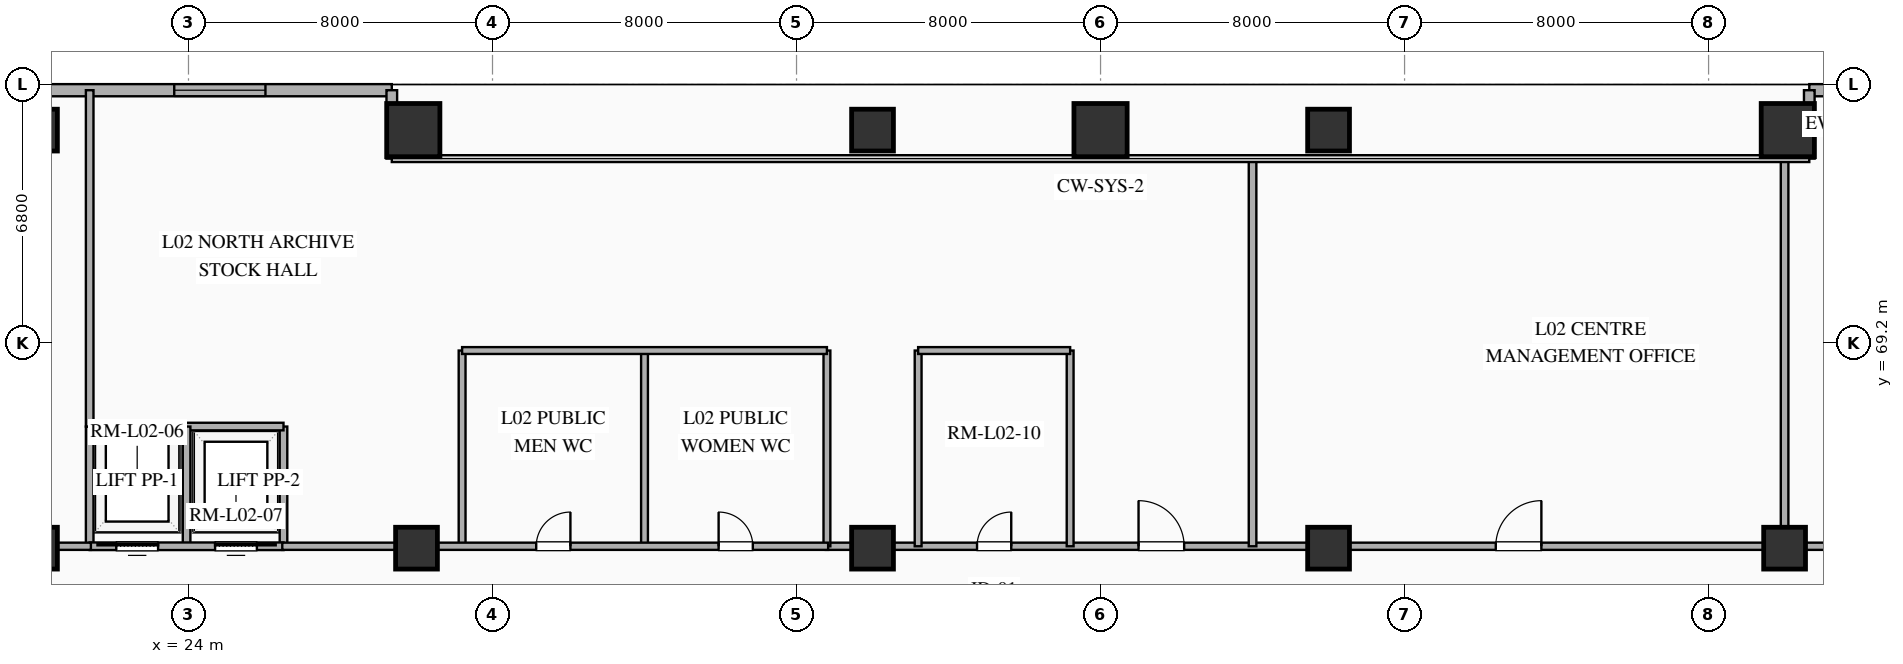
"""IFC4 building model, lengths in metres.
Left out: names, types, materials, properties, quantities, classifications, styles, units other than length and angle.
Written with IfcOpenShell. Run it as: python <this file> out.ifc"""

import sys

from ifc_helpers import new_model, si_unit, direction, frame, frame_2d, origin, origin_2d, place, context, subcontext, project, spatial, rectangle, extrude, element, fill, save


model = new_model("IFC4")
c1 = context("Model", 3, precision=1e-05, world=origin(), true_north=direction((0.0, 1.0)))
c2 = subcontext(c1, "Body", "Model", "MODEL_VIEW")
j1 = project(units=[si_unit("LENGTHUNIT", "METRE"), si_unit("PLANEANGLEUNIT", "RADIAN")], contexts=[c1])
p1 = place(None, origin())
s1 = spatial("IfcSite", under=j1, at=p1, CompositionType="ELEMENT")
p2 = place(p1, origin())
s2 = spatial("IfcBuilding", under=s1, at=p2, CompositionType="ELEMENT")
p3 = place(p2, frame((0.0, 0.0, 11.4)))
s3 = spatial("IfcBuildingStorey", under=s2, at=p3, CompositionType="ELEMENT", Elevation=11.4)
for number, where, z_axis, x_axis in (
    (1, (20.0, 74.8, 0.0), (0.0, 0.0, 1.0), (1.0, 0.0, 0.0)),
    (2, (20.0, 63.8, 0.0), (0.0, 0.0, 1.0), (1.0, 0.0, 0.0)),
    (3, (30.0, 63.8, 0.0), (0.0, 0.0, 1.0), (1.0, 0.0, 0.0)),
    (4, (42.0, 74.8, 0.0), (0.0, 0.0, 1.0), (1.0, 0.0, 0.0)),
    (5, (42.0, 63.8, 0.0), (0.0, 0.0, 1.0), (1.0, 0.0, 0.0)),
    (6, (54.0, 74.8, 0.0), (0.0, 0.0, 1.0), (1.0, 0.0, 0.0)),
    (7, (54.0, 63.8, 0.0), (0.0, 0.0, 1.0), (1.0, 0.0, 0.0)),
    (8, (66.0, 63.8, 0.0), (0.0, 0.0, 1.0), (1.0, 0.0, 0.0)),
):
    element("IfcColumn", number, at=place(p3, frame(where, z_axis=z_axis, x_axis=x_axis)), inside=s3, PredefinedType="COLUMN", context=c2, shape_type="SweptSolid", body=[
        extrude(rectangle(XDim=1.1, YDim=1.1, at=origin_2d()), origin(), (0.0, 0.0, 1.0), 5.1),
    ])
for number, where, z_axis, x_axis in (
    (9, (66.084, 74.8, 0.0), (0.0, 0.0, 1.0), (1.0, 0.0, 0.0)),
    (10, (48.0, 74.8, 0.0), (0.0, 0.0, 1.0), (1.0, 0.0, 0.0)),
    (11, (29.916, 74.8, 0.0), (0.0, 0.0, 1.0), (1.0, 0.0, 0.0)),
):
    element("IfcColumn", number, at=place(p3, frame(where, z_axis=z_axis, x_axis=x_axis)), inside=s3, PredefinedType="COLUMN", context=c2, shape_type="SweptSolid", body=[
        extrude(rectangle(XDim=1.4, YDim=1.4, at=origin_2d()), origin(), (0.0, 0.0, 1.0), 5.1),
    ])
p4 = place(p3, frame((66.65, 75.85, 0.0), z_axis=(0.0, 0.0, 1.0), x_axis=(1.0, 0.0, 0.0)))
e12 = element("IfcWall", 12, at=p4, inside=s3, PredefinedType="SOLIDWALL", context=c2, shape_type="SweptSolid", body=[
    extrude(rectangle(XDim=10.55, YDim=0.32, at=frame_2d((5.275, 0.0))), origin(), (0.0, 0.0, 1.0), 5.1),
])
p5 = place(p4, frame((3.45, 0.0, 0.9)))
e13 = element("IfcOpeningElement", 13, at=p5, cuts=e12, PredefinedType="OPENING", context=c2, shape_type="SweptSolid", body=[
    extrude(rectangle(XDim=2.4, YDim=2.6, at=frame_2d((1.2, 1.3))), frame((0.0, 0.17, 0.0), z_axis=(0.0, -1.0, 0.0), x_axis=(1.0, 0.0, 0.0)), (0.0, 0.0, 1.0), 0.34),
])
p6 = place(p3, frame((18.8, 75.85, 0.0), z_axis=(0.0, 0.0, 1.0), x_axis=(1.0, 0.0, 0.0)))
e14 = element("IfcWall", 14, at=p6, inside=s3, PredefinedType="SOLIDWALL", context=c2, shape_type="SweptSolid", body=[
    extrude(rectangle(XDim=10.55, YDim=0.32, at=frame_2d((5.275, 0.0))), origin(), (0.0, 0.0, 1.0), 5.1),
])
p7 = place(p6, frame((4.825, 0.0, 0.9)))
e15 = element("IfcOpeningElement", 15, at=p7, cuts=e14, PredefinedType="OPENING", context=c2, shape_type="SweptSolid", body=[
    extrude(rectangle(XDim=2.4, YDim=2.6, at=frame_2d((1.2, 1.3))), frame((0.0, 0.17, 0.0), z_axis=(0.0, -1.0, 0.0), x_axis=(1.0, 0.0, 0.0)), (0.0, 0.0, 1.0), 0.34),
])
for number, where, z_axis, x_axis in (
    (16, (66.65, 75.85, 0.0), (0.0, 0.0, 1.0), (0.0, -1.0, 0.0)),
    (17, (29.35, 74.05, 0.0), (0.0, 0.0, 1.0), (0.0, 1.0, 0.0)),
):
    element("IfcWall", number, at=place(p3, frame(where, z_axis=z_axis, x_axis=x_axis)), inside=s3, PredefinedType="SOLIDWALL", context=c2, shape_type="SweptSolid", body=[
        extrude(rectangle(XDim=1.8, YDim=0.28, at=frame_2d((0.9, 0.0))), origin(), (0.0, 0.0, 1.0), 5.1),
    ])
for number, where, z_axis, x_axis in (
    (18, (21.4, 63.85, 0.0), (0.0, 0.0, 1.0), (0.0, 1.0, 0.0)),
    (19, (26.5, 63.85, 0.0), (0.0, 0.0, 1.0), (0.0, 1.0, 0.0)),
):
    element("IfcWall", number, at=place(p3, frame(where, z_axis=z_axis, x_axis=x_axis)), inside=s3, PredefinedType="SOLIDWALL", context=c2, shape_type="SweptSolid", body=[
        extrude(rectangle(XDim=3.15, YDim=0.2, at=frame_2d((1.575, 0.0))), origin(), (0.0, 0.0, 1.0), 4.3),
    ])
p8 = place(p3, frame((21.4, 67.0, 0.0), z_axis=(0.0, 0.0, 1.0), x_axis=(1.0, 0.0, 0.0)))
e20 = element("IfcWall", 20, at=p8, inside=s3, PredefinedType="SOLIDWALL", context=c2, shape_type="SweptSolid", body=[
    extrude(rectangle(XDim=5.1, YDim=0.2, at=frame_2d((2.55, 0.0))), origin(), (0.0, 0.0, 1.0), 4.3),
])
p9 = place(p3, frame((23.95, 63.85, 0.0), z_axis=(0.0, 0.0, 1.0), x_axis=(0.0, 1.0, 0.0)))
e21 = element("IfcWall", 21, at=p9, inside=s3, PredefinedType="SOLIDWALL", context=c2, shape_type="SweptSolid", body=[
    extrude(rectangle(XDim=3.15, YDim=0.2, at=frame_2d((1.575, 0.0))), origin(), (0.0, 0.0, 1.0), 4.3),
])
p10 = place(p3, frame((21.4, 63.85, 0.0), z_axis=(0.0, 0.0, 1.0), x_axis=(1.0, 0.0, 0.0)))
e22 = element("IfcWall", 22, at=p10, inside=s3, PredefinedType="SOLIDWALL", context=c2, shape_type="SweptSolid", body=[
    extrude(rectangle(XDim=5.1, YDim=0.2, at=frame_2d((2.55, 0.0))), origin(), (0.0, 0.0, 1.0), 4.3),
])
p11 = place(p10, frame((0.7, 0.0, 0.0)))
e23 = element("IfcOpeningElement", 23, at=p11, cuts=e22, PredefinedType="OPENING", context=c2, shape_type="SweptSolid", body=[
    extrude(rectangle(XDim=1.1, YDim=2.2, at=frame_2d((0.55, 1.1))), frame((0.0, 0.11, 0.0), z_axis=(0.0, -1.0, 0.0), x_axis=(1.0, 0.0, 0.0)), (0.0, 0.0, 1.0), 0.22),
])
p12 = place(p10, frame((3.3, 0.0, 0.0)))
e24 = element("IfcOpeningElement", 24, at=p12, cuts=e22, PredefinedType="OPENING", context=c2, shape_type="SweptSolid", body=[
    extrude(rectangle(XDim=1.1, YDim=2.2, at=frame_2d((0.55, 1.1))), frame((0.0, 0.11, 0.0), z_axis=(0.0, -1.0, 0.0), x_axis=(1.0, 0.0, 0.0)), (0.0, 0.0, 1.0), 0.22),
])
p13 = place(p3, frame((40.768, 63.85, 0.0), z_axis=(0.0, 0.0, 1.0), x_axis=(1.0, 0.0, 0.0)))
e25 = element("IfcWall", 25, at=p13, inside=s3, PredefinedType="PARTITIONING", context=c2, shape_type="SweptSolid", body=[
    extrude(rectangle(XDim=40.514, YDim=0.19, at=frame_2d((20.257, 0.0))), origin(), (0.0, 0.0, 1.0), 4.3),
])
p14 = place(p13, frame((32.257, 0.0, 0.0)))
e26 = element("IfcOpeningElement", 26, at=p14, cuts=e25, PredefinedType="OPENING", context=c2, shape_type="SweptSolid", body=[
    extrude(rectangle(XDim=1.2, YDim=2.25, at=frame_2d((0.6, 1.125))), frame((0.0, 0.105, 0.0), z_axis=(0.0, -1.0, 0.0), x_axis=(1.0, 0.0, 0.0)), (0.0, 0.0, 1.0), 0.21),
])
p15 = place(p13, frame((17.632, 0.0, 0.0)))
e27 = element("IfcOpeningElement", 27, at=p15, cuts=e25, PredefinedType="OPENING", context=c2, shape_type="SweptSolid", body=[
    extrude(rectangle(XDim=1.2, YDim=2.25, at=frame_2d((0.6, 1.125))), frame((0.0, 0.105, 0.0), z_axis=(0.0, -1.0, 0.0), x_axis=(1.0, 0.0, 0.0)), (0.0, 0.0, 1.0), 0.21),
])
p16 = place(p13, frame((8.232, 0.0, 0.0)))
e28 = element("IfcOpeningElement", 28, at=p16, cuts=e25, PredefinedType="OPENING", context=c2, shape_type="SweptSolid", body=[
    extrude(rectangle(XDim=1.2, YDim=2.25, at=frame_2d((0.6, 1.125))), frame((0.0, 0.105, 0.0), z_axis=(0.0, -1.0, 0.0), x_axis=(1.0, 0.0, 0.0)), (0.0, 0.0, 1.0), 0.21),
])
p17 = place(p13, frame((3.982, 0.0, 0.0)))
e29 = element("IfcOpeningElement", 29, at=p17, cuts=e25, PredefinedType="OPENING", context=c2, shape_type="SweptSolid", body=[
    extrude(rectangle(XDim=0.9, YDim=2.1, at=frame_2d((0.45, 1.05))), frame((0.0, 0.105, 0.0), z_axis=(0.0, -1.0, 0.0), x_axis=(1.0, 0.0, 0.0)), (0.0, 0.0, 1.0), 0.21),
])
for number, where, z_axis, x_axis in (
    (30, (52.0, 74.05, 0.0), (0.0, 0.0, 1.0), (0.0, -1.0, 0.0)),
    (31, (66.0, 74.05, 0.0), (0.0, 0.0, 1.0), (0.0, -1.0, 0.0)),
):
    element("IfcWall", number, at=place(p3, frame(where, z_axis=z_axis, x_axis=x_axis)), inside=s3, PredefinedType="PARTITIONING", context=c2, shape_type="SweptSolid", body=[
        extrude(rectangle(XDim=10.2, YDim=0.2, at=frame_2d((5.1, 0.0))), origin(), (0.0, 0.0, 1.0), 4.3),
    ])
p18 = place(p3, frame((21.4, 67.0, 0.0), z_axis=(0.0, 0.0, 1.0), x_axis=(0.0, 1.0, 0.0)))
e32 = element("IfcWall", 32, at=p18, inside=s3, PredefinedType="PARTITIONING", context=c2, shape_type="SweptSolid", body=[
    extrude(rectangle(XDim=8.85, YDim=0.2, at=frame_2d((4.425, 0.0))), origin(), (0.0, 0.0, 1.0), 4.3),
])
p19 = place(p3, frame((14.718, 63.85, 0.0), z_axis=(0.0, 0.0, 1.0), x_axis=(1.0, 0.0, 0.0)))
e33 = element("IfcWall", 33, at=p19, inside=s3, PredefinedType="PARTITIONING", context=c2, shape_type="SweptSolid", body=[
    extrude(rectangle(XDim=6.714, YDim=0.19, at=frame_2d((3.357, 0.0))), origin(), (0.0, 0.0, 1.0), 4.3),
])
p20 = place(p19, frame((2.457, 0.0, 0.0)))
e34 = element("IfcOpeningElement", 34, at=p20, cuts=e33, PredefinedType="OPENING", context=c2, shape_type="SweptSolid", body=[
    extrude(rectangle(XDim=1.2, YDim=2.25, at=frame_2d((0.6, 1.125))), frame((0.0, 0.105, 0.0), z_axis=(0.0, -1.0, 0.0), x_axis=(1.0, 0.0, 0.0)), (0.0, 0.0, 1.0), 0.21),
])
for number, where, z_axis, x_axis in (
    (35, (36.0, 69.0, 0.0), (0.0, 0.0, 1.0), (0.0, -1.0, 0.0)),
    (36, (31.2, 63.85, 0.0), (0.0, 0.0, 1.0), (0.0, 1.0, 0.0)),
    (37, (40.8, 69.0, 0.0), (0.0, 0.0, 1.0), (0.0, -1.0, 0.0)),
    (38, (43.2, 63.85, 0.0), (0.0, 0.0, 1.0), (0.0, 1.0, 0.0)),
    (39, (47.2, 69.0, 0.0), (0.0, 0.0, 1.0), (0.0, -1.0, 0.0)),
):
    element("IfcWall", number, at=place(p3, frame(where, z_axis=z_axis, x_axis=x_axis)), inside=s3, PredefinedType="PLUMBINGWALL", context=c2, shape_type="SweptSolid", body=[
        extrude(rectangle(XDim=5.15, YDim=0.18, at=frame_2d((2.575, 0.0))), origin(), (0.0, 0.0, 1.0), 4.3),
    ])
p21 = place(p3, frame((26.468, 63.85, 0.0), z_axis=(0.0, 0.0, 1.0), x_axis=(1.0, 0.0, 0.0)))
e40 = element("IfcWall", 40, at=p21, inside=s3, PredefinedType="PARTITIONING", context=c2, shape_type="SweptSolid", body=[
    extrude(rectangle(XDim=14.364, YDim=0.19, at=frame_2d((7.182, 0.0))), origin(), (0.0, 0.0, 1.0), 4.3),
])
p22 = place(p21, frame((6.682, 0.0, 0.0)))
e41 = element("IfcOpeningElement", 41, at=p22, cuts=e40, PredefinedType="OPENING", context=c2, shape_type="SweptSolid", body=[
    extrude(rectangle(XDim=0.9, YDim=2.1, at=frame_2d((0.45, 1.05))), frame((0.0, 0.105, 0.0), z_axis=(0.0, -1.0, 0.0), x_axis=(1.0, 0.0, 0.0)), (0.0, 0.0, 1.0), 0.21),
])
p23 = place(p21, frame((11.482, 0.0, 0.0)))
e42 = element("IfcOpeningElement", 42, at=p23, cuts=e40, PredefinedType="OPENING", context=c2, shape_type="SweptSolid", body=[
    extrude(rectangle(XDim=0.9, YDim=2.1, at=frame_2d((0.45, 1.05))), frame((0.0, 0.105, 0.0), z_axis=(0.0, -1.0, 0.0), x_axis=(1.0, 0.0, 0.0)), (0.0, 0.0, 1.0), 0.21),
])
p24 = place(p3, frame((31.2, 69.0, 0.0), z_axis=(0.0, 0.0, 1.0), x_axis=(1.0, 0.0, 0.0)))
e43 = element("IfcWall", 43, at=p24, inside=s3, PredefinedType="PLUMBINGWALL", context=c2, shape_type="SweptSolid", body=[
    extrude(rectangle(XDim=9.6, YDim=0.18, at=frame_2d((4.8, 0.0))), origin(), (0.0, 0.0, 1.0), 4.3),
])
p25 = place(p3, frame((43.2, 69.0, 0.0), z_axis=(0.0, 0.0, 1.0), x_axis=(1.0, 0.0, 0.0)))
e44 = element("IfcWall", 44, at=p25, inside=s3, PredefinedType="PLUMBINGWALL", context=c2, shape_type="SweptSolid", body=[
    extrude(rectangle(XDim=4.0, YDim=0.18, at=frame_2d((2.0, 0.0))), origin(), (0.0, 0.0, 1.0), 4.3),
])
p26 = place(p7, origin())
e45 = element("IfcWindow", 45, at=p26, inside=s3, PartitioningType="SINGLE_PANEL", PredefinedType="WINDOW", context=c2, shape_type="SweptSolid", body=[
    extrude(rectangle(XDim=2.4, YDim=2.6, at=frame_2d((1.2, 1.3))), frame((0.0, 0.03, 0.0), z_axis=(0.0, -1.0, 0.0), x_axis=(1.0, 0.0, 0.0)), (0.0, 0.0, 1.0), 0.06),
])
fill(e15, e45)
p27 = place(p11, origin())
e46 = element("IfcDoor", 46, at=p27, inside=s3, OperationType="SLIDING_TO_LEFT", PredefinedType="DOOR", context=c2, shape_type="SweptSolid", body=[
    extrude(rectangle(XDim=1.1, YDim=2.2, at=frame_2d((0.55, 1.1))), frame((0.0, 0.025, 0.0), z_axis=(0.0, -1.0, 0.0), x_axis=(1.0, 0.0, 0.0)), (0.0, 0.0, 1.0), 0.05),
])
fill(e23, e46)
p28 = place(p12, origin())
e47 = element("IfcDoor", 47, at=p28, inside=s3, OperationType="SLIDING_TO_RIGHT", PredefinedType="DOOR", context=c2, shape_type="SweptSolid", body=[
    extrude(rectangle(XDim=1.1, YDim=2.2, at=frame_2d((0.55, 1.1))), frame((0.0, 0.025, 0.0), z_axis=(0.0, -1.0, 0.0), x_axis=(1.0, 0.0, 0.0)), (0.0, 0.0, 1.0), 0.05),
])
fill(e24, e47)
p29 = place(p15, origin())
e48 = element("IfcDoor", 48, at=p29, inside=s3, OperationType="SINGLE_SWING_RIGHT", PredefinedType="DOOR", context=c2, shape_type="SweptSolid", body=[
    extrude(rectangle(XDim=1.2, YDim=2.25, at=frame_2d((0.6, 1.125))), frame((0.0, 0.025, 0.0), z_axis=(0.0, -1.0, 0.0), x_axis=(1.0, 0.0, 0.0)), (0.0, 0.0, 1.0), 0.05),
])
fill(e27, e48)
p30 = place(p16, origin())
e49 = element("IfcDoor", 49, at=p30, inside=s3, OperationType="SINGLE_SWING_LEFT", PredefinedType="DOOR", context=c2, shape_type="SweptSolid", body=[
    extrude(rectangle(XDim=1.2, YDim=2.25, at=frame_2d((0.6, 1.125))), frame((0.0, 0.025, 0.0), z_axis=(0.0, -1.0, 0.0), x_axis=(1.0, 0.0, 0.0)), (0.0, 0.0, 1.0), 0.05),
])
fill(e28, e49)
p31 = place(p17, origin())
e50 = element("IfcDoor", 50, at=p31, inside=s3, OperationType="SINGLE_SWING_RIGHT", PredefinedType="DOOR", context=c2, shape_type="SweptSolid", body=[
    extrude(rectangle(XDim=0.9, YDim=2.1, at=frame_2d((0.45, 1.05))), frame((0.0, 0.025, 0.0), z_axis=(0.0, -1.0, 0.0), x_axis=(1.0, 0.0, 0.0)), (0.0, 0.0, 1.0), 0.05),
])
fill(e29, e50)
p32 = place(p22, origin())
e51 = element("IfcDoor", 51, at=p32, inside=s3, OperationType="SINGLE_SWING_RIGHT", PredefinedType="DOOR", context=c2, shape_type="SweptSolid", body=[
    extrude(rectangle(XDim=0.9, YDim=2.1, at=frame_2d((0.45, 1.05))), frame((0.0, 0.025, 0.0), z_axis=(0.0, -1.0, 0.0), x_axis=(1.0, 0.0, 0.0)), (0.0, 0.0, 1.0), 0.05),
])
fill(e41, e51)
p33 = place(p23, origin())
e52 = element("IfcDoor", 52, at=p33, inside=s3, OperationType="SINGLE_SWING_LEFT", PredefinedType="DOOR", context=c2, shape_type="SweptSolid", body=[
    extrude(rectangle(XDim=0.9, YDim=2.1, at=frame_2d((0.45, 1.05))), frame((0.0, 0.025, 0.0), z_axis=(0.0, -1.0, 0.0), x_axis=(1.0, 0.0, 0.0)), (0.0, 0.0, 1.0), 0.05),
])
fill(e42, e52)
save(model, sys.argv[1])
